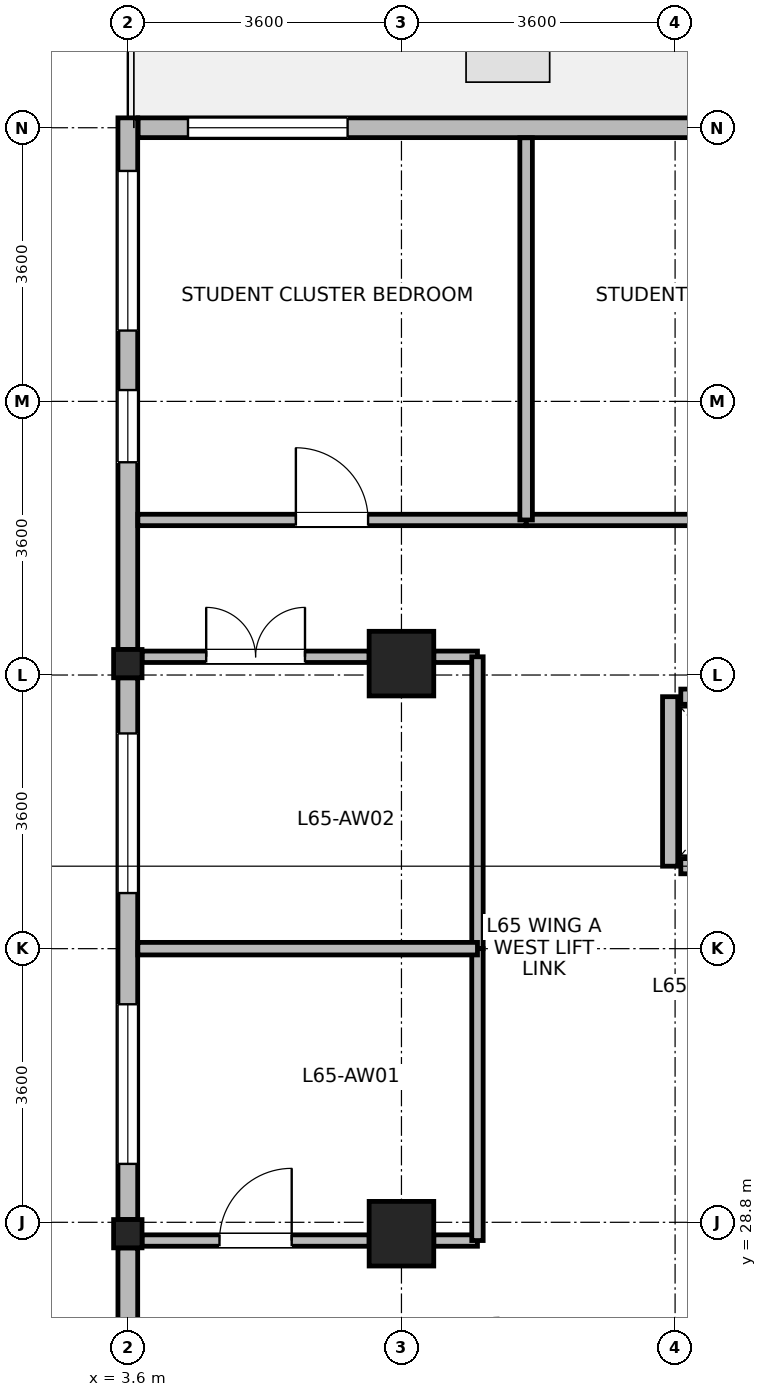
"""IFC4 building model, lengths in metres.
Left out: names, types, materials, properties, quantities, classifications, styles, units other than length and angle.
Written with IfcOpenShell. Run it as: python <this file> out.ifc"""

import sys

from ifc_helpers import new_model, si_unit, direction, frame, frame_2d, origin, origin_2d, place, context, subcontext, project, spatial, rectangle, i_section, extrude, source, transform, mapped, element, fill, save


model = new_model("IFC4")
c1 = context("Model", 3, precision=1e-05, world=origin(), true_north=direction((0.0, 1.0)))
c2 = subcontext(c1, "Body", "Model", "MODEL_VIEW")
j1 = project(units=[si_unit("LENGTHUNIT", "METRE"), si_unit("PLANEANGLEUNIT", "RADIAN")], contexts=[c1])
p1 = place(None, origin())
s1 = spatial("IfcSite", under=j1, at=p1, CompositionType="ELEMENT")
p2 = place(p1, origin())
s2 = spatial("IfcBuilding", under=s1, at=p2, CompositionType="ELEMENT")
p3 = place(p2, frame((0.0, 0.0, 253.6)))
s3 = spatial("IfcBuildingStorey", under=s2, at=p3, CompositionType="ELEMENT", Elevation=253.6)
m1 = source(origin(), c2, "Body", "SweptSolid", [
    extrude(rectangle(XDim=0.85, YDim=0.85, at=origin_2d()), origin(), (0.0, 0.0, 1.0), 3.7),
])
for number, where, z_axis, x_axis in (
    (1, (7.2, 28.65, 0.0), (0.0, 0.0, 1.0), (1.0, 0.0, 0.0)),
    (2, (7.2, 36.15, 0.0), (0.0, 0.0, 1.0), (1.0, 0.0, 0.0)),
):
    element("IfcColumn", number, at=place(p3, frame(where, z_axis=z_axis, x_axis=x_axis)), inside=s3, PredefinedType="COLUMN", context=c2, shape_type="MappedRepresentation", body=[
        mapped(m1, transform((0.0, 0.0, 0.0), x_axis=(1.0, 0.0, 0.0), y_axis=(0.0, 1.0, 0.0), z_axis=(0.0, 0.0, 1.0), scale=1.0)),
    ])
m2 = source(origin(), c2, "Body", "SweptSolid", [
    extrude(i_section(OverallWidth=0.374, OverallDepth=0.372, WebThickness=0.015, FlangeThickness=0.026, FilletRadius=0.015, at=origin_2d()), origin(), (0.0, 0.0, 1.0), 3.7),
])
for number, where, z_axis, x_axis in (
    (3, (3.6, 28.65, 0.0), (0.0, 0.0, 1.0), (1.0, 0.0, 0.0)),
    (4, (3.6, 36.15, 0.0), (0.0, 0.0, 1.0), (1.0, 0.0, 0.0)),
):
    element("IfcColumn", number, at=place(p3, frame(where, z_axis=z_axis, x_axis=x_axis)), inside=s3, PredefinedType="COLUMN", context=c2, shape_type="MappedRepresentation", body=[
        mapped(m2, transform((0.0, 0.0, 0.0), x_axis=(1.0, 0.0, 0.0), y_axis=(0.0, 1.0, 0.0), z_axis=(0.0, 0.0, 1.0), scale=1.0)),
    ])
p4 = place(p3, frame((3.735, 43.2, 0.0), z_axis=(0.0, 0.0, 1.0), x_axis=(1.0, 0.0, 0.0)))
e5 = element("IfcWall", 5, at=p4, inside=s3, PredefinedType="STANDARD", context=c2, shape_type="SweptSolid", body=[
    extrude(rectangle(XDim=10.239, YDim=0.26, at=frame_2d((5.12, 0.0))), origin(), (0.0, 0.0, 1.0), 3.455),
])
p5 = place(p4, frame((0.656, 0.0, 0.85)))
e6 = element("IfcOpeningElement", 6, at=p5, cuts=e5, PredefinedType="OPENING", context=c2, shape_type="SweptSolid", body=[
    extrude(rectangle(XDim=2.1, YDim=1.95, at=frame_2d((1.05, 0.975))), frame((0.0, 0.14, 0.0), z_axis=(0.0, -1.0, 0.0), x_axis=(1.0, 0.0, 0.0)), (0.0, 0.0, 1.0), 0.28),
])
p6 = place(p4, frame((7.482, 0.0, 0.85)))
e7 = element("IfcOpeningElement", 7, at=p6, cuts=e5, PredefinedType="OPENING", context=c2, shape_type="SweptSolid", body=[
    extrude(rectangle(XDim=2.1, YDim=1.95, at=frame_2d((1.05, 0.975))), frame((0.0, 0.14, 0.0), z_axis=(0.0, -1.0, 0.0), x_axis=(1.0, 0.0, 0.0)), (0.0, 0.0, 1.0), 0.28),
])
p7 = place(p3, frame((3.6, 36.337, 0.0), z_axis=(0.0, 0.0, 1.0), x_axis=(0.0, 1.0, 0.0)))
e8 = element("IfcWall", 8, at=p7, inside=s3, PredefinedType="STANDARD", context=c2, shape_type="SweptSolid", body=[
    extrude(rectangle(XDim=6.993, YDim=0.26, at=frame_2d((3.497, 0.0))), origin(), (0.0, 0.0, 1.0), 3.455),
])
p8 = place(p7, frame((4.195, 0.0, 0.85)))
e9 = element("IfcOpeningElement", 9, at=p8, cuts=e8, PredefinedType="OPENING", context=c2, shape_type="SweptSolid", body=[
    extrude(rectangle(XDim=2.1, YDim=1.95, at=frame_2d((1.05, 0.975))), frame((0.0, 0.14, 0.0), z_axis=(0.0, -1.0, 0.0), x_axis=(1.0, 0.0, 0.0)), (0.0, 0.0, 1.0), 0.28),
])
p9 = place(p7, frame((2.462, 0.0, 0.85)))
e10 = element("IfcOpeningElement", 10, at=p9, cuts=e8, PredefinedType="OPENING", context=c2, shape_type="SweptSolid", body=[
    extrude(rectangle(XDim=0.95, YDim=1.75, at=frame_2d((0.475, 0.875))), frame((0.0, 0.14, 0.0), z_axis=(0.0, -1.0, 0.0), x_axis=(1.0, 0.0, 0.0)), (0.0, 0.0, 1.0), 0.28),
])
p10 = place(p3, frame((3.6, 28.837, 0.0), z_axis=(0.0, 0.0, 1.0), x_axis=(0.0, 1.0, 0.0)))
e11 = element("IfcWall", 11, at=p10, inside=s3, PredefinedType="STANDARD", context=c2, shape_type="SweptSolid", body=[
    extrude(rectangle(XDim=7.126, YDim=0.26, at=frame_2d((3.563, 0.0))), origin(), (0.0, 0.0, 1.0), 3.055),
])
p11 = place(p10, frame((0.731, 0.0, 0.85)))
e12 = element("IfcOpeningElement", 12, at=p11, cuts=e11, PredefinedType="OPENING", context=c2, shape_type="SweptSolid", body=[
    extrude(rectangle(XDim=2.1, YDim=1.95, at=frame_2d((1.05, 0.975))), frame((0.0, 0.14, 0.0), z_axis=(0.0, -1.0, 0.0), x_axis=(1.0, 0.0, 0.0)), (0.0, 0.0, 1.0), 0.28),
])
p12 = place(p10, frame((4.294, 0.0, 0.85)))
e13 = element("IfcOpeningElement", 13, at=p12, cuts=e11, PredefinedType="OPENING", context=c2, shape_type="SweptSolid", body=[
    extrude(rectangle(XDim=2.1, YDim=1.95, at=frame_2d((1.05, 0.975))), frame((0.0, 0.14, 0.0), z_axis=(0.0, -1.0, 0.0), x_axis=(1.0, 0.0, 0.0)), (0.0, 0.0, 1.0), 0.28),
])
p13 = place(p3, frame((3.6, 21.47, 0.0), z_axis=(0.0, 0.0, 1.0), x_axis=(0.0, 1.0, 0.0)))
e14 = element("IfcWall", 14, at=p13, inside=s3, PredefinedType="STANDARD", context=c2, shape_type="SweptSolid", body=[
    extrude(rectangle(XDim=6.993, YDim=0.26, at=frame_2d((3.497, 0.0))), origin(), (0.0, 0.0, 1.0), 3.455),
])
p14 = place(p13, frame((0.698, 0.0, 0.85)))
e15 = element("IfcOpeningElement", 15, at=p14, cuts=e14, PredefinedType="OPENING", context=c2, shape_type="SweptSolid", body=[
    extrude(rectangle(XDim=2.1, YDim=1.95, at=frame_2d((1.05, 0.975))), frame((0.0, 0.14, 0.0), z_axis=(0.0, -1.0, 0.0), x_axis=(1.0, 0.0, 0.0)), (0.0, 0.0, 1.0), 0.28),
])
p15 = place(p13, frame((3.581, 0.0, 0.85)))
e16 = element("IfcOpeningElement", 16, at=p15, cuts=e14, PredefinedType="OPENING", context=c2, shape_type="SweptSolid", body=[
    extrude(rectangle(XDim=0.95, YDim=1.75, at=frame_2d((0.475, 0.875))), frame((0.0, 0.14, 0.0), z_axis=(0.0, -1.0, 0.0), x_axis=(1.0, 0.0, 0.0)), (0.0, 0.0, 1.0), 0.28),
])
p16 = place(p3, frame((10.875, 33.485, 0.0), z_axis=(0.0, 0.0, 1.0), x_axis=(1.0, 0.0, 0.0)))
e17 = element("IfcWall", 17, at=p16, inside=s3, PredefinedType="PARTITIONING", context=c2, shape_type="SweptSolid", body=[
    extrude(rectangle(XDim=1.65, YDim=0.2, at=frame_2d((0.825, 0.0))), origin(), (0.0, 0.0, 1.0), 3.455),
])
p17 = place(p16, frame((0.275, 0.0, 0.0)))
e18 = element("IfcOpeningElement", 18, at=p17, cuts=e17, PredefinedType="OPENING", context=c2, shape_type="SweptSolid", body=[
    extrude(rectangle(XDim=1.1, YDim=2.12, at=frame_2d((0.55, 1.06))), frame((0.0, 0.11, 0.0), z_axis=(0.0, -1.0, 0.0), x_axis=(1.0, 0.0, 0.0)), (0.0, 0.0, 1.0), 0.22),
])
p18 = place(p3, frame((10.875, 35.715, 0.0), z_axis=(0.0, 0.0, 1.0), x_axis=(1.0, 0.0, 0.0)))
e19 = element("IfcWall", 19, at=p18, inside=s3, PredefinedType="PARTITIONING", context=c2, shape_type="SweptSolid", body=[
    extrude(rectangle(XDim=1.65, YDim=0.2, at=frame_2d((0.825, 0.0))), origin(), (0.0, 0.0, 1.0), 3.455),
])
p19 = place(p3, frame((10.735, 33.485, 0.0), z_axis=(0.0, 0.0, 1.0), x_axis=(0.0, 1.0, 0.0)))
e20 = element("IfcWall", 20, at=p19, inside=s3, PredefinedType="PARTITIONING", context=c2, shape_type="SweptSolid", body=[
    extrude(rectangle(XDim=2.23, YDim=0.2, at=frame_2d((1.115, 0.0))), origin(), (0.0, 0.0, 1.0), 3.455),
])
p20 = place(p3, frame((8.84, 38.04, 0.0), z_axis=(0.0, 0.0, 1.0), x_axis=(1.0, 0.0, 0.0)))
e21 = element("IfcWall", 21, at=p20, inside=s3, PredefinedType="PARTITIONING", context=c2, shape_type="SweptSolid", body=[
    extrude(rectangle(XDim=5.66, YDim=0.15, at=frame_2d((2.83, 0.0))), origin(), (0.0, 0.0, 1.0), 3.455),
])
p21 = place(p20, frame((2.355, 0.0, 0.0)))
e22 = element("IfcOpeningElement", 22, at=p21, cuts=e21, PredefinedType="OPENING", context=c2, shape_type="SweptSolid", body=[
    extrude(rectangle(XDim=0.95, YDim=2.1, at=frame_2d((0.475, 1.05))), frame((0.0, 0.085, 0.0), z_axis=(0.0, -1.0, 0.0), x_axis=(1.0, 0.0, 0.0)), (0.0, 0.0, 1.0), 0.17),
])
p22 = place(p3, frame((3.732, 38.04, 0.0), z_axis=(0.0, 0.0, 1.0), x_axis=(1.0, 0.0, 0.0)))
e23 = element("IfcWall", 23, at=p22, inside=s3, PredefinedType="PARTITIONING", context=c2, shape_type="SweptSolid", body=[
    extrude(rectangle(XDim=5.108, YDim=0.15, at=frame_2d((2.554, 0.0))), origin(), (0.0, 0.0, 1.0), 3.455),
])
p23 = place(p22, frame((2.079, 0.0, 0.0)))
e24 = element("IfcOpeningElement", 24, at=p23, cuts=e23, PredefinedType="OPENING", context=c2, shape_type="SweptSolid", body=[
    extrude(rectangle(XDim=0.95, YDim=2.1, at=frame_2d((0.475, 1.05))), frame((0.0, 0.085, 0.0), z_axis=(0.0, -1.0, 0.0), x_axis=(1.0, 0.0, 0.0)), (0.0, 0.0, 1.0), 0.17),
])
p24 = place(p3, frame((3.787, 28.56, 0.0), z_axis=(0.0, 0.0, 1.0), x_axis=(1.0, 0.0, 0.0)))
e25 = element("IfcWall", 25, at=p24, inside=s3, PredefinedType="PARTITIONING", context=c2, shape_type="SweptSolid", body=[
    extrude(rectangle(XDim=2.988, YDim=0.15, at=frame_2d((1.494, 0.0))), origin(), (0.0, 0.0, 1.0), 2.905),
])
p25 = place(p24, frame((1.019, 0.0, 0.0)))
e26 = element("IfcOpeningElement", 26, at=p25, cuts=e25, PredefinedType="OPENING", context=c2, shape_type="SweptSolid", body=[
    extrude(rectangle(XDim=0.95, YDim=2.1, at=frame_2d((0.475, 1.05))), frame((0.0, 0.085, 0.0), z_axis=(0.0, -1.0, 0.0), x_axis=(1.0, 0.0, 0.0)), (0.0, 0.0, 1.0), 0.17),
])
p26 = place(p3, frame((7.625, 28.56, 0.0), z_axis=(0.0, 0.0, 1.0), x_axis=(1.0, 0.0, 0.0)))
e27 = element("IfcWall", 27, at=p26, inside=s3, PredefinedType="PARTITIONING", context=c2, shape_type="SweptSolid", body=[
    extrude(rectangle(XDim=0.575, YDim=0.15, at=frame_2d((0.288, 0.0))), origin(), (0.0, 0.0, 1.0), 2.905),
])
p27 = place(p3, frame((3.787, 36.24, 0.0), z_axis=(0.0, 0.0, 1.0), x_axis=(1.0, 0.0, 0.0)))
e28 = element("IfcWall", 28, at=p27, inside=s3, PredefinedType="PARTITIONING", context=c2, shape_type="SweptSolid", body=[
    extrude(rectangle(XDim=2.988, YDim=0.15, at=frame_2d((1.494, 0.0))), origin(), (0.0, 0.0, 1.0), 2.905),
])
p28 = place(p27, frame((0.844, 0.0, 0.0)))
e29 = element("IfcOpeningElement", 29, at=p28, cuts=e28, PredefinedType="OPENING", context=c2, shape_type="SweptSolid", body=[
    extrude(rectangle(XDim=1.3, YDim=2.12, at=frame_2d((0.65, 1.06))), frame((0.0, 0.085, 0.0), z_axis=(0.0, -1.0, 0.0), x_axis=(1.0, 0.0, 0.0)), (0.0, 0.0, 1.0), 0.17),
])
p29 = place(p3, frame((7.625, 36.24, 0.0), z_axis=(0.0, 0.0, 1.0), x_axis=(1.0, 0.0, 0.0)))
e30 = element("IfcWall", 30, at=p29, inside=s3, PredefinedType="PARTITIONING", context=c2, shape_type="SweptSolid", body=[
    extrude(rectangle(XDim=0.575, YDim=0.15, at=frame_2d((0.288, 0.0))), origin(), (0.0, 0.0, 1.0), 2.905),
])
p30 = place(p3, frame((8.2, 32.4, 0.0), z_axis=(0.0, 0.0, 1.0), x_axis=(0.0, 1.0, 0.0)))
e31 = element("IfcWall", 31, at=p30, inside=s3, PredefinedType="PARTITIONING", context=c2, shape_type="SweptSolid", body=[
    extrude(rectangle(XDim=3.84, YDim=0.15, at=frame_2d((1.92, 0.0))), origin(), (0.0, 0.0, 1.0), 3.455),
])
p31 = place(p3, frame((8.2, 28.56, 0.0), z_axis=(0.0, 0.0, 1.0), x_axis=(0.0, 1.0, 0.0)))
e32 = element("IfcWall", 32, at=p31, inside=s3, PredefinedType="PARTITIONING", context=c2, shape_type="SweptSolid", body=[
    extrude(rectangle(XDim=3.84, YDim=0.15, at=frame_2d((1.92, 0.0))), origin(), (0.0, 0.0, 1.0), 3.455),
])
p32 = place(p3, frame((8.84, 38.04, 0.0), z_axis=(0.0, 0.0, 1.0), x_axis=(0.0, 1.0, 0.0)))
e33 = element("IfcWall", 33, at=p32, inside=s3, PredefinedType="PARTITIONING", context=c2, shape_type="SweptSolid", body=[
    extrude(rectangle(XDim=5.028, YDim=0.165, at=frame_2d((2.514, 0.0))), origin(), (0.0, 0.0, 1.0), 3.455),
])
p33 = place(p3, frame((3.732, 32.4, 0.0), z_axis=(0.0, 0.0, 1.0), x_axis=(1.0, 0.0, 0.0)))
e34 = element("IfcWall", 34, at=p33, inside=s3, PredefinedType="PARTITIONING", context=c2, shape_type="SweptSolid", body=[
    extrude(rectangle(XDim=4.468, YDim=0.165, at=frame_2d((2.234, 0.0))), origin(), (0.0, 0.0, 1.0), 3.455),
])
p34 = place(p5, origin())
e35 = element("IfcWindow", 35, at=p34, inside=s3, PartitioningType="SINGLE_PANEL", PredefinedType="WINDOW", context=c2, shape_type="SweptSolid", body=[
    extrude(rectangle(XDim=2.1, YDim=1.95, at=frame_2d((1.05, 0.975))), frame((0.0, 0.03, 0.0), z_axis=(0.0, -1.0, 0.0), x_axis=(1.0, 0.0, 0.0)), (0.0, 0.0, 1.0), 0.06),
])
fill(e6, e35)
p35 = place(p8, origin())
e36 = element("IfcWindow", 36, at=p35, inside=s3, PartitioningType="SINGLE_PANEL", PredefinedType="WINDOW", context=c2, shape_type="SweptSolid", body=[
    extrude(rectangle(XDim=2.1, YDim=1.95, at=frame_2d((1.05, 0.975))), frame((0.0, 0.03, 0.0), z_axis=(0.0, -1.0, 0.0), x_axis=(1.0, 0.0, 0.0)), (0.0, 0.0, 1.0), 0.06),
])
fill(e9, e36)
p36 = place(p9, origin())
e37 = element("IfcWindow", 37, at=p36, inside=s3, PartitioningType="SINGLE_PANEL", PredefinedType="WINDOW", context=c2, shape_type="SweptSolid", body=[
    extrude(rectangle(XDim=0.95, YDim=1.75, at=frame_2d((0.475, 0.875))), frame((0.0, 0.03, 0.0), z_axis=(0.0, -1.0, 0.0), x_axis=(1.0, 0.0, 0.0)), (0.0, 0.0, 1.0), 0.06),
])
fill(e10, e37)
p37 = place(p11, origin())
e38 = element("IfcWindow", 38, at=p37, inside=s3, PartitioningType="SINGLE_PANEL", PredefinedType="WINDOW", context=c2, shape_type="SweptSolid", body=[
    extrude(rectangle(XDim=2.1, YDim=1.95, at=frame_2d((1.05, 0.975))), frame((0.0, 0.03, 0.0), z_axis=(0.0, -1.0, 0.0), x_axis=(1.0, 0.0, 0.0)), (0.0, 0.0, 1.0), 0.06),
])
fill(e12, e38)
p38 = place(p12, origin())
e39 = element("IfcWindow", 39, at=p38, inside=s3, PartitioningType="SINGLE_PANEL", PredefinedType="WINDOW", context=c2, shape_type="SweptSolid", body=[
    extrude(rectangle(XDim=2.1, YDim=1.95, at=frame_2d((1.05, 0.975))), frame((0.0, 0.03, 0.0), z_axis=(0.0, -1.0, 0.0), x_axis=(1.0, 0.0, 0.0)), (0.0, 0.0, 1.0), 0.06),
])
fill(e13, e39)
p39 = place(p23, origin())
e40 = element("IfcDoor", 40, at=p39, inside=s3, OperationType="SINGLE_SWING_LEFT", PredefinedType="DOOR", context=c2, shape_type="SweptSolid", body=[
    extrude(rectangle(XDim=0.95, YDim=2.1, at=frame_2d((0.475, 1.05))), frame((0.0, 0.025, 0.0), z_axis=(0.0, -1.0, 0.0), x_axis=(1.0, 0.0, 0.0)), (0.0, 0.0, 1.0), 0.05),
])
fill(e24, e40)
p40 = place(p25, origin())
e41 = element("IfcDoor", 41, at=p40, inside=s3, OperationType="SINGLE_SWING_RIGHT", PredefinedType="DOOR", context=c2, shape_type="SweptSolid", body=[
    extrude(rectangle(XDim=0.95, YDim=2.1, at=frame_2d((0.475, 1.05))), frame((0.0, 0.025, 0.0), z_axis=(0.0, -1.0, 0.0), x_axis=(1.0, 0.0, 0.0)), (0.0, 0.0, 1.0), 0.05),
])
fill(e26, e41)
p41 = place(p28, origin())
e42 = element("IfcDoor", 42, at=p41, inside=s3, OperationType="DOUBLE_DOOR_SINGLE_SWING", PredefinedType="DOOR", context=c2, shape_type="SweptSolid", body=[
    extrude(rectangle(XDim=1.3, YDim=2.12, at=frame_2d((0.65, 1.06))), frame((0.0, 0.025, 0.0), z_axis=(0.0, -1.0, 0.0), x_axis=(1.0, 0.0, 0.0)), (0.0, 0.0, 1.0), 0.05),
])
fill(e29, e42)
save(model, sys.argv[1])
